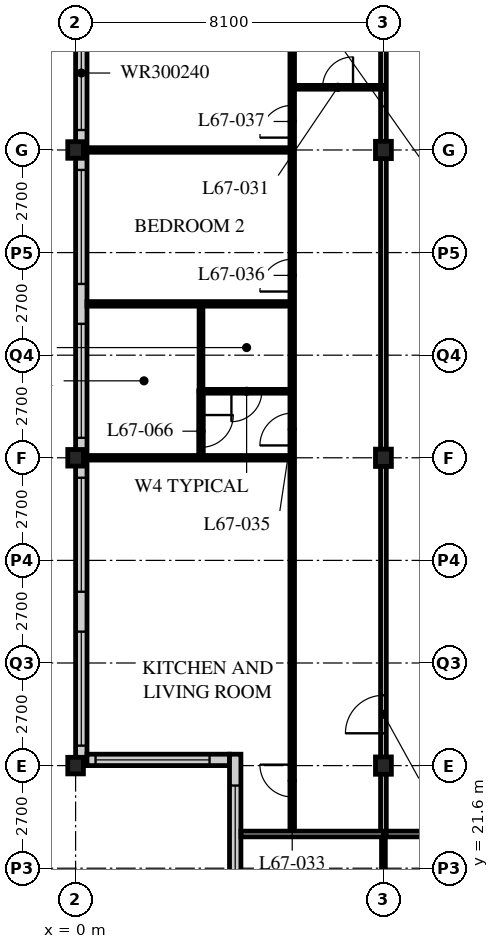
"""IFC4 building model, lengths in metres.
Left out: names, types, materials, properties, quantities, classifications, styles, units other than length and angle.
Written with IfcOpenShell. Run it as: python <this file> out.ifc"""

import sys

from ifc_helpers import new_model, si_unit, direction, frame, frame_2d, origin, origin_2d, place, context, subcontext, project, spatial, rectangle, i_section, extrude, element, fill, save


model = new_model("IFC4")
c1 = context("Model", 3, precision=1e-05, world=origin(), true_north=direction((0.0, 1.0)))
c2 = subcontext(c1, "Body", "Model", "MODEL_VIEW")
j1 = project(units=[si_unit("LENGTHUNIT", "METRE"), si_unit("PLANEANGLEUNIT", "RADIAN")], contexts=[c1])
p1 = place(None, origin())
s1 = spatial("IfcSite", under=j1, at=p1, CompositionType="ELEMENT")
p2 = place(p1, origin())
s2 = spatial("IfcBuilding", under=s1, at=p2, CompositionType="ELEMENT")
p3 = place(p2, frame((0.0, 0.0, 261.9)))
s3 = spatial("IfcBuildingStorey", under=s2, at=p3, CompositionType="ELEMENT", Elevation=261.9)
for number, where, z_axis, x_axis in (
    (1, (0.0, 24.3, 0.0), (0.0, 0.0, 1.0), (1.0, 0.0, 0.0)),
    (2, (0.0, 32.4, 0.0), (0.0, 0.0, 1.0), (1.0, 0.0, 0.0)),
    (3, (0.0, 40.5, 0.0), (0.0, 0.0, 1.0), (1.0, 0.0, 0.0)),
):
    element("IfcColumn", number, at=place(p3, frame(where, z_axis=z_axis, x_axis=x_axis)), inside=s3, PredefinedType="COLUMN", context=c2, shape_type="SweptSolid", body=[
        extrude(i_section(OverallWidth=0.412, OverallDepth=0.437, WebThickness=0.036, FlangeThickness=0.058, FilletRadius=0.015, at=origin_2d()), origin(), (0.0, 0.0, 1.0), 3.9),
    ])
for number, where, z_axis, x_axis in (
    (4, (8.1, 24.3, 0.0), (0.0, 0.0, 1.0), (1.0, 0.0, 0.0)),
    (5, (8.1, 32.4, 0.0), (0.0, 0.0, 1.0), (1.0, 0.0, 0.0)),
    (6, (8.1, 40.5, 0.0), (0.0, 0.0, 1.0), (1.0, 0.0, 0.0)),
):
    element("IfcColumn", number, at=place(p3, frame(where, z_axis=z_axis, x_axis=x_axis)), inside=s3, PredefinedType="COLUMN", context=c2, shape_type="SweptSolid", body=[
        extrude(i_section(OverallWidth=0.418, OverallDepth=0.456, WebThickness=0.042, FlangeThickness=0.067, FilletRadius=0.015, at=origin_2d()), origin(), (0.0, 0.0, 1.0), 3.9),
    ])
p4 = place(p3, frame((0.15, 56.4, 0.0), z_axis=(0.0, 0.0, 1.0), x_axis=(0.0, -1.0, 0.0)))
e7 = element("IfcWall", 7, at=p4, inside=s3, PredefinedType="SOLIDWALL", context=c2, shape_type="SweptSolid", body=[
    extrude(rectangle(XDim=32.1, YDim=0.3, at=frame_2d((16.05, 0.0))), origin(), (0.0, 0.0, 1.0), 3.69),
])
p5 = place(p4, frame((0.225, 0.0, 0.6)))
e8 = element("IfcOpeningElement", 8, at=p5, cuts=e7, PredefinedType="OPENING", context=c2, shape_type="SweptSolid", body=[
    extrude(rectangle(XDim=3.0, YDim=2.4, at=frame_2d((1.5, 1.2))), frame((0.0, 0.16, 0.0), z_axis=(0.0, -1.0, 0.0), x_axis=(1.0, 0.0, 0.0)), (0.0, 0.0, 1.0), 0.32),
])
p6 = place(p4, frame((4.275, 0.0, 0.6)))
e9 = element("IfcOpeningElement", 9, at=p6, cuts=e7, PredefinedType="OPENING", context=c2, shape_type="SweptSolid", body=[
    extrude(rectangle(XDim=3.0, YDim=2.4, at=frame_2d((1.5, 1.2))), frame((0.0, 0.16, 0.0), z_axis=(0.0, -1.0, 0.0), x_axis=(1.0, 0.0, 0.0)), (0.0, 0.0, 1.0), 0.32),
])
p7 = place(p4, frame((8.325, 0.0, 0.6)))
e10 = element("IfcOpeningElement", 10, at=p7, cuts=e7, PredefinedType="OPENING", context=c2, shape_type="SweptSolid", body=[
    extrude(rectangle(XDim=3.0, YDim=2.4, at=frame_2d((1.5, 1.2))), frame((0.0, 0.16, 0.0), z_axis=(0.0, -1.0, 0.0), x_axis=(1.0, 0.0, 0.0)), (0.0, 0.0, 1.0), 0.32),
])
p8 = place(p4, frame((12.375, 0.0, 0.6)))
e11 = element("IfcOpeningElement", 11, at=p8, cuts=e7, PredefinedType="OPENING", context=c2, shape_type="SweptSolid", body=[
    extrude(rectangle(XDim=3.0, YDim=2.4, at=frame_2d((1.5, 1.2))), frame((0.0, 0.16, 0.0), z_axis=(0.0, -1.0, 0.0), x_axis=(1.0, 0.0, 0.0)), (0.0, 0.0, 1.0), 0.32),
])
p9 = place(p4, frame((16.425, 0.0, 0.6)))
e12 = element("IfcOpeningElement", 12, at=p9, cuts=e7, PredefinedType="OPENING", context=c2, shape_type="SweptSolid", body=[
    extrude(rectangle(XDim=3.0, YDim=2.4, at=frame_2d((1.5, 1.2))), frame((0.0, 0.16, 0.0), z_axis=(0.0, -1.0, 0.0), x_axis=(1.0, 0.0, 0.0)), (0.0, 0.0, 1.0), 0.32),
])
p10 = place(p4, frame((20.475, 0.0, 0.6)))
e13 = element("IfcOpeningElement", 13, at=p10, cuts=e7, PredefinedType="OPENING", context=c2, shape_type="SweptSolid", body=[
    extrude(rectangle(XDim=3.0, YDim=2.4, at=frame_2d((1.5, 1.2))), frame((0.0, 0.16, 0.0), z_axis=(0.0, -1.0, 0.0), x_axis=(1.0, 0.0, 0.0)), (0.0, 0.0, 1.0), 0.32),
])
p11 = place(p4, frame((24.525, 0.0, 0.6)))
e14 = element("IfcOpeningElement", 14, at=p11, cuts=e7, PredefinedType="OPENING", context=c2, shape_type="SweptSolid", body=[
    extrude(rectangle(XDim=3.0, YDim=2.4, at=frame_2d((1.5, 1.2))), frame((0.0, 0.16, 0.0), z_axis=(0.0, -1.0, 0.0), x_axis=(1.0, 0.0, 0.0)), (0.0, 0.0, 1.0), 0.32),
])
p12 = place(p4, frame((28.575, 0.0, 0.6)))
e15 = element("IfcOpeningElement", 15, at=p12, cuts=e7, PredefinedType="OPENING", context=c2, shape_type="SweptSolid", body=[
    extrude(rectangle(XDim=3.0, YDim=2.4, at=frame_2d((1.5, 1.2))), frame((0.0, 0.16, 0.0), z_axis=(0.0, -1.0, 0.0), x_axis=(1.0, 0.0, 0.0)), (0.0, 0.0, 1.0), 0.32),
])
p13 = place(p3, frame((0.3, 24.45, 0.0), z_axis=(0.0, 0.0, 1.0), x_axis=(1.0, 0.0, 0.0)))
e16 = element("IfcWall", 16, at=p13, inside=s3, PredefinedType="SOLIDWALL", context=c2, shape_type="SweptSolid", body=[
    extrude(rectangle(XDim=3.75, YDim=0.3, at=frame_2d((1.875, 0.0))), origin(), (0.0, 0.0, 1.0), 3.69),
])
p14 = place(p13, frame((0.225, 0.0, 0.6)))
e17 = element("IfcOpeningElement", 17, at=p14, cuts=e16, PredefinedType="OPENING", context=c2, shape_type="SweptSolid", body=[
    extrude(rectangle(XDim=3.0, YDim=2.3, at=frame_2d((1.5, 1.15))), frame((0.0, 0.16, 0.0), z_axis=(0.0, -1.0, 0.0), x_axis=(1.0, 0.0, 0.0)), (0.0, 0.0, 1.0), 0.32),
])
p15 = place(p3, frame((4.2, 24.6, 0.0), z_axis=(0.0, 0.0, 1.0), x_axis=(0.0, -1.0, 0.0)))
e18 = element("IfcWall", 18, at=p15, inside=s3, PredefinedType="SOLIDWALL", context=c2, shape_type="SweptSolid", body=[
    extrude(rectangle(XDim=4.35, YDim=0.3, at=frame_2d((2.175, 0.0))), origin(), (0.0, 0.0, 1.0), 3.69),
])
p16 = place(p15, frame((0.825, 0.0, 0.6)))
e19 = element("IfcOpeningElement", 19, at=p16, cuts=e18, PredefinedType="OPENING", context=c2, shape_type="SweptSolid", body=[
    extrude(rectangle(XDim=3.0, YDim=2.3, at=frame_2d((1.5, 1.15))), frame((0.0, 0.16, 0.0), z_axis=(0.0, -1.0, 0.0), x_axis=(1.0, 0.0, 0.0)), (0.0, 0.0, 1.0), 0.32),
])
p17 = place(p3, frame((8.1, 22.5, 0.0), z_axis=(0.0, 0.0, 1.0), x_axis=(1.0, 0.0, 0.0)))
e20 = element("IfcWall", 20, at=p17, inside=s3, PredefinedType="PARTITIONING", context=c2, shape_type="SweptSolid", body=[
    extrude(rectangle(XDim=28.35, YDim=0.15, at=frame_2d((14.175, 0.0))), origin(), (0.0, 0.0, 1.0), 3.69),
])
p18 = place(p17, frame((4.45, 0.0, 0.0)))
e21 = element("IfcOpeningElement", 21, at=p18, cuts=e20, PredefinedType="OPENING", context=c2, shape_type="SweptSolid", body=[
    extrude(rectangle(XDim=1.0, YDim=2.1, at=frame_2d((0.5, 1.05))), frame((0.0, 0.085, 0.0), z_axis=(0.0, -1.0, 0.0), x_axis=(1.0, 0.0, 0.0)), (0.0, 0.0, 1.0), 0.17),
])
p19 = place(p17, frame((12.55, 0.0, 0.0)))
e22 = element("IfcOpeningElement", 22, at=p19, cuts=e20, PredefinedType="OPENING", context=c2, shape_type="SweptSolid", body=[
    extrude(rectangle(XDim=1.0, YDim=2.1, at=frame_2d((0.5, 1.05))), frame((0.0, 0.085, 0.0), z_axis=(0.0, -1.0, 0.0), x_axis=(1.0, 0.0, 0.0)), (0.0, 0.0, 1.0), 0.17),
])
p20 = place(p17, frame((20.65, 0.0, 0.0)))
e23 = element("IfcOpeningElement", 23, at=p20, cuts=e20, PredefinedType="OPENING", context=c2, shape_type="SweptSolid", body=[
    extrude(rectangle(XDim=1.0, YDim=2.1, at=frame_2d((0.5, 1.05))), frame((0.0, 0.085, 0.0), z_axis=(0.0, -1.0, 0.0), x_axis=(1.0, 0.0, 0.0)), (0.0, 0.0, 1.0), 0.17),
])
p21 = place(p17, frame((2.625, 0.0, 0.0)))
e24 = element("IfcOpeningElement", 24, at=p21, cuts=e20, PredefinedType="OPENING", context=c2, shape_type="SweptSolid", body=[
    extrude(rectangle(XDim=1.0, YDim=2.1, at=frame_2d((0.5, 1.05))), frame((0.0, 0.085, 0.0), z_axis=(0.0, -1.0, 0.0), x_axis=(1.0, 0.0, 0.0)), (0.0, 0.0, 1.0), 0.17),
])
p22 = place(p3, frame((8.1, 22.5, 0.0), z_axis=(0.0, 0.0, 1.0), x_axis=(0.0, 1.0, 0.0)))
e25 = element("IfcWall", 25, at=p22, inside=s3, PredefinedType="PARTITIONING", context=c2, shape_type="SweptSolid", body=[
    extrude(rectangle(XDim=26.1, YDim=0.15, at=frame_2d((13.05, 0.0))), origin(), (0.0, 0.0, 1.0), 3.078),
])
p23 = place(p22, frame((2.65, 0.0, 0.0)))
e26 = element("IfcOpeningElement", 26, at=p23, cuts=e25, PredefinedType="OPENING", context=c2, shape_type="SweptSolid", body=[
    extrude(rectangle(XDim=1.0, YDim=2.1, at=frame_2d((0.5, 1.05))), frame((0.0, 0.085, 0.0), z_axis=(0.0, -1.0, 0.0), x_axis=(1.0, 0.0, 0.0)), (0.0, 0.0, 1.0), 0.17),
])
p24 = place(p22, frame((22.75, 0.0, 0.0)))
e27 = element("IfcOpeningElement", 27, at=p24, cuts=e25, PredefinedType="OPENING", context=c2, shape_type="SweptSolid", body=[
    extrude(rectangle(XDim=1.0, YDim=2.1, at=frame_2d((0.5, 1.05))), frame((0.0, 0.085, 0.0), z_axis=(0.0, -1.0, 0.0), x_axis=(1.0, 0.0, 0.0)), (0.0, 0.0, 1.0), 0.17),
])
p25 = place(p3, frame((5.7, 22.5, 0.0), z_axis=(0.0, 0.0, 1.0), x_axis=(0.0, 1.0, 0.0)))
e28 = element("IfcWall", 28, at=p25, inside=s3, PredefinedType="PARTITIONING", context=c2, shape_type="SweptSolid", body=[
    extrude(rectangle(XDim=22.05, YDim=0.12, at=frame_2d((11.025, 0.0))), origin(), (0.0, 0.0, 1.0), 3.69),
])
p26 = place(p25, frame((0.975, 0.0, 0.0)))
e29 = element("IfcOpeningElement", 29, at=p26, cuts=e28, PredefinedType="OPENING", context=c2, shape_type="SweptSolid", body=[
    extrude(rectangle(XDim=0.85, YDim=2.1, at=frame_2d((0.425, 1.05))), frame((0.0, 0.07, 0.0), z_axis=(0.0, -1.0, 0.0), x_axis=(1.0, 0.0, 0.0)), (0.0, 0.0, 1.0), 0.14),
])
p27 = place(p25, frame((10.225, 0.0, 0.0)))
e30 = element("IfcOpeningElement", 30, at=p27, cuts=e28, PredefinedType="OPENING", context=c2, shape_type="SweptSolid", body=[
    extrude(rectangle(XDim=0.85, YDim=2.1, at=frame_2d((0.425, 1.05))), frame((0.0, 0.07, 0.0), z_axis=(0.0, -1.0, 0.0), x_axis=(1.0, 0.0, 0.0)), (0.0, 0.0, 1.0), 0.14),
])
p28 = place(p25, frame((14.275, 0.0, 0.0)))
e31 = element("IfcOpeningElement", 31, at=p28, cuts=e28, PredefinedType="OPENING", context=c2, shape_type="SweptSolid", body=[
    extrude(rectangle(XDim=0.85, YDim=2.1, at=frame_2d((0.425, 1.05))), frame((0.0, 0.07, 0.0), z_axis=(0.0, -1.0, 0.0), x_axis=(1.0, 0.0, 0.0)), (0.0, 0.0, 1.0), 0.14),
])
p29 = place(p25, frame((18.325, 0.0, 0.0)))
e32 = element("IfcOpeningElement", 32, at=p29, cuts=e28, PredefinedType="OPENING", context=c2, shape_type="SweptSolid", body=[
    extrude(rectangle(XDim=0.85, YDim=2.1, at=frame_2d((0.425, 1.05))), frame((0.0, 0.07, 0.0), z_axis=(0.0, -1.0, 0.0), x_axis=(1.0, 0.0, 0.0)), (0.0, 0.0, 1.0), 0.14),
])
p30 = place(p3, frame((8.1, 42.15, 0.0), z_axis=(0.0, 0.0, 1.0), x_axis=(-1.0, 0.0, 0.0)))
e33 = element("IfcWall", 33, at=p30, inside=s3, PredefinedType="PARTITIONING", context=c2, shape_type="SweptSolid", body=[
    extrude(rectangle(XDim=2.4, YDim=0.1, at=frame_2d((1.2, 0.0))), origin(), (0.0, 0.0, 1.0), 3.69),
])
p31 = place(p30, frame((0.8, 0.0, 0.0)))
e34 = element("IfcOpeningElement", 34, at=p31, cuts=e33, PredefinedType="OPENING", context=c2, shape_type="SweptSolid", body=[
    extrude(rectangle(XDim=0.8, YDim=2.1, at=frame_2d((0.4, 1.05))), frame((0.0, 0.06, 0.0), z_axis=(0.0, -1.0, 0.0), x_axis=(1.0, 0.0, 0.0)), (0.0, 0.0, 1.0), 0.12),
])
p32 = place(p3, frame((5.7, 34.15, 0.0), z_axis=(0.0, 0.0, 1.0), x_axis=(-1.0, 0.0, 0.0)))
e35 = element("IfcWall", 35, at=p32, inside=s3, PredefinedType="PARTITIONING", context=c2, shape_type="SweptSolid", body=[
    extrude(rectangle(XDim=2.4, YDim=0.1, at=frame_2d((1.2, 0.0))), origin(), (0.0, 0.0, 1.0), 3.69),
])
p33 = place(p32, frame((0.8, 0.0, 0.0)))
e36 = element("IfcOpeningElement", 36, at=p33, cuts=e35, PredefinedType="OPENING", context=c2, shape_type="SweptSolid", body=[
    extrude(rectangle(XDim=0.8, YDim=2.1, at=frame_2d((0.4, 1.05))), frame((0.0, 0.06, 0.0), z_axis=(0.0, -1.0, 0.0), x_axis=(1.0, 0.0, 0.0)), (0.0, 0.0, 1.0), 0.12),
])
p34 = place(p3, frame((3.3, 34.15, 0.0), z_axis=(0.0, 0.0, 1.0), x_axis=(0.0, 1.0, 0.0)))
e37 = element("IfcWall", 37, at=p34, inside=s3, PredefinedType="PARTITIONING", context=c2, shape_type="SweptSolid", body=[
    extrude(rectangle(XDim=2.3, YDim=0.1, at=frame_2d((1.15, 0.0))), origin(), (0.0, 0.0, 1.0), 3.69),
])
p35 = place(p3, frame((5.7, 32.4, 0.0), z_axis=(0.0, 0.0, 1.0), x_axis=(-1.0, 0.0, 0.0)))
e38 = element("IfcWall", 38, at=p35, inside=s3, PredefinedType="PARTITIONING", context=c2, shape_type="SweptSolid", body=[
    extrude(rectangle(XDim=5.4, YDim=0.12, at=frame_2d((2.7, 0.0))), origin(), (0.0, 0.0, 1.0), 3.078),
])
p36 = place(p3, frame((5.7, 36.45, 0.0), z_axis=(0.0, 0.0, 1.0), x_axis=(-1.0, 0.0, 0.0)))
e39 = element("IfcWall", 39, at=p36, inside=s3, PredefinedType="PARTITIONING", context=c2, shape_type="SweptSolid", body=[
    extrude(rectangle(XDim=5.4, YDim=0.12, at=frame_2d((2.7, 0.0))), origin(), (0.0, 0.0, 1.0), 3.69),
])
p37 = place(p3, frame((5.7, 40.5, 0.0), z_axis=(0.0, 0.0, 1.0), x_axis=(-1.0, 0.0, 0.0)))
e40 = element("IfcWall", 40, at=p37, inside=s3, PredefinedType="PARTITIONING", context=c2, shape_type="SweptSolid", body=[
    extrude(rectangle(XDim=5.4, YDim=0.12, at=frame_2d((2.7, 0.0))), origin(), (0.0, 0.0, 1.0), 3.078),
])
p38 = place(p3, frame((8.1, 22.5, 0.0), z_axis=(0.0, 0.0, 1.0), x_axis=(0.0, -1.0, 0.0)))
e41 = element("IfcWall", 41, at=p38, inside=s3, PredefinedType="PARTITIONING", context=c2, shape_type="SweptSolid", body=[
    extrude(rectangle(XDim=1.95, YDim=0.1, at=frame_2d((0.975, 0.0))), origin(), (0.0, 0.0, 1.0), 3.078),
])
p39 = place(p3, frame((4.35, 22.5, 0.0), z_axis=(0.0, 0.0, 1.0), x_axis=(1.0, 0.0, 0.0)))
e42 = element("IfcWall", 42, at=p39, inside=s3, PredefinedType="PARTITIONING", context=c2, shape_type="SweptSolid", body=[
    extrude(rectangle(XDim=3.75, YDim=0.15, at=frame_2d((1.875, 0.0))), origin(), (0.0, 0.0, 1.0), 3.69),
])
p40 = place(p3, frame((3.3, 32.4, 0.0), z_axis=(0.0, 0.0, 1.0), x_axis=(0.0, 1.0, 0.0)))
e43 = element("IfcWall", 43, at=p40, inside=s3, PredefinedType="PARTITIONING", context=c2, shape_type="SweptSolid", body=[
    extrude(rectangle(XDim=1.76, YDim=0.12, at=frame_2d((0.88, 0.0))), origin(), (0.0, 0.0, 1.0), 3.69),
])
p41 = place(p40, frame((0.275, 0.0, 0.0)))
e44 = element("IfcOpeningElement", 44, at=p41, cuts=e43, PredefinedType="OPENING", context=c2, shape_type="SweptSolid", body=[
    extrude(rectangle(XDim=0.85, YDim=2.1, at=frame_2d((0.425, 1.05))), frame((0.0, 0.07, 0.0), z_axis=(0.0, -1.0, 0.0), x_axis=(1.0, 0.0, 0.0)), (0.0, 0.0, 1.0), 0.14),
])
p42 = place(p8, origin())
e45 = element("IfcWindow", 45, at=p42, inside=s3, PartitioningType="SINGLE_PANEL", PredefinedType="WINDOW", context=c2, shape_type="SweptSolid", body=[
    extrude(rectangle(XDim=3.0, YDim=2.4, at=frame_2d((1.5, 1.2))), frame((0.0, 0.03, 0.0), z_axis=(0.0, -1.0, 0.0), x_axis=(1.0, 0.0, 0.0)), (0.0, 0.0, 1.0), 0.06),
])
fill(e11, e45)
p43 = place(p9, origin())
e46 = element("IfcWindow", 46, at=p43, inside=s3, PartitioningType="SINGLE_PANEL", PredefinedType="WINDOW", context=c2, shape_type="SweptSolid", body=[
    extrude(rectangle(XDim=3.0, YDim=2.4, at=frame_2d((1.5, 1.2))), frame((0.0, 0.03, 0.0), z_axis=(0.0, -1.0, 0.0), x_axis=(1.0, 0.0, 0.0)), (0.0, 0.0, 1.0), 0.06),
])
fill(e12, e46)
p44 = place(p10, origin())
e47 = element("IfcWindow", 47, at=p44, inside=s3, PartitioningType="SINGLE_PANEL", PredefinedType="WINDOW", context=c2, shape_type="SweptSolid", body=[
    extrude(rectangle(XDim=3.0, YDim=2.4, at=frame_2d((1.5, 1.2))), frame((0.0, 0.03, 0.0), z_axis=(0.0, -1.0, 0.0), x_axis=(1.0, 0.0, 0.0)), (0.0, 0.0, 1.0), 0.06),
])
fill(e13, e47)
p45 = place(p11, origin())
e48 = element("IfcWindow", 48, at=p45, inside=s3, PartitioningType="SINGLE_PANEL", PredefinedType="WINDOW", context=c2, shape_type="SweptSolid", body=[
    extrude(rectangle(XDim=3.0, YDim=2.4, at=frame_2d((1.5, 1.2))), frame((0.0, 0.03, 0.0), z_axis=(0.0, -1.0, 0.0), x_axis=(1.0, 0.0, 0.0)), (0.0, 0.0, 1.0), 0.06),
])
fill(e14, e48)
p46 = place(p12, origin())
e49 = element("IfcWindow", 49, at=p46, inside=s3, PartitioningType="SINGLE_PANEL", PredefinedType="WINDOW", context=c2, shape_type="SweptSolid", body=[
    extrude(rectangle(XDim=3.0, YDim=2.4, at=frame_2d((1.5, 1.2))), frame((0.0, 0.03, 0.0), z_axis=(0.0, -1.0, 0.0), x_axis=(1.0, 0.0, 0.0)), (0.0, 0.0, 1.0), 0.06),
])
fill(e15, e49)
p47 = place(p14, origin())
e50 = element("IfcWindow", 50, at=p47, inside=s3, PartitioningType="SINGLE_PANEL", PredefinedType="WINDOW", context=c2, shape_type="SweptSolid", body=[
    extrude(rectangle(XDim=3.0, YDim=2.3, at=frame_2d((1.5, 1.15))), frame((0.0, 0.03, 0.0), z_axis=(0.0, -1.0, 0.0), x_axis=(1.0, 0.0, 0.0)), (0.0, 0.0, 1.0), 0.06),
])
fill(e17, e50)
p48 = place(p16, origin())
e51 = element("IfcWindow", 51, at=p48, inside=s3, PartitioningType="SINGLE_PANEL", PredefinedType="WINDOW", context=c2, shape_type="SweptSolid", body=[
    extrude(rectangle(XDim=3.0, YDim=2.3, at=frame_2d((1.5, 1.15))), frame((0.0, 0.03, 0.0), z_axis=(0.0, -1.0, 0.0), x_axis=(1.0, 0.0, 0.0)), (0.0, 0.0, 1.0), 0.06),
])
fill(e19, e51)
p49 = place(p31, origin())
e52 = element("IfcDoor", 52, at=p49, inside=s3, OperationType="SINGLE_SWING_RIGHT", PredefinedType="DOOR", context=c2, shape_type="SweptSolid", body=[
    extrude(rectangle(XDim=0.8, YDim=2.1, at=frame_2d((0.4, 1.05))), frame((0.0, 0.025, 0.0), z_axis=(0.0, -1.0, 0.0), x_axis=(1.0, 0.0, 0.0)), (0.0, 0.0, 1.0), 0.05),
])
fill(e34, e52)
p50 = place(p23, origin())
e53 = element("IfcDoor", 53, at=p50, inside=s3, OperationType="SINGLE_SWING_LEFT", PredefinedType="DOOR", context=c2, shape_type="SweptSolid", body=[
    extrude(rectangle(XDim=1.0, YDim=2.1, at=frame_2d((0.5, 1.05))), frame((0.0, 0.025, 0.0), z_axis=(0.0, -1.0, 0.0), x_axis=(1.0, 0.0, 0.0)), (0.0, 0.0, 1.0), 0.05),
])
fill(e26, e53)
p51 = place(p26, origin())
e54 = element("IfcDoor", 54, at=p51, inside=s3, OperationType="SINGLE_SWING_RIGHT", PredefinedType="DOOR", context=c2, shape_type="SweptSolid", body=[
    extrude(rectangle(XDim=0.85, YDim=2.1, at=frame_2d((0.425, 1.05))), frame((0.0, 0.025, 0.0), z_axis=(0.0, -1.0, 0.0), x_axis=(1.0, 0.0, 0.0)), (0.0, 0.0, 1.0), 0.05),
])
fill(e29, e54)
p52 = place(p33, origin())
e55 = element("IfcDoor", 55, at=p52, inside=s3, OperationType="SINGLE_SWING_RIGHT", PredefinedType="DOOR", context=c2, shape_type="SweptSolid", body=[
    extrude(rectangle(XDim=0.8, YDim=2.1, at=frame_2d((0.4, 1.05))), frame((0.0, 0.025, 0.0), z_axis=(0.0, -1.0, 0.0), x_axis=(1.0, 0.0, 0.0)), (0.0, 0.0, 1.0), 0.05),
])
fill(e36, e55)
p53 = place(p27, origin())
e56 = element("IfcDoor", 56, at=p53, inside=s3, OperationType="SINGLE_SWING_LEFT", PredefinedType="DOOR", context=c2, shape_type="SweptSolid", body=[
    extrude(rectangle(XDim=0.85, YDim=2.1, at=frame_2d((0.425, 1.05))), frame((0.0, 0.025, 0.0), z_axis=(0.0, -1.0, 0.0), x_axis=(1.0, 0.0, 0.0)), (0.0, 0.0, 1.0), 0.05),
])
fill(e30, e56)
p54 = place(p28, origin())
e57 = element("IfcDoor", 57, at=p54, inside=s3, OperationType="SINGLE_SWING_LEFT", PredefinedType="DOOR", context=c2, shape_type="SweptSolid", body=[
    extrude(rectangle(XDim=0.85, YDim=2.1, at=frame_2d((0.425, 1.05))), frame((0.0, 0.025, 0.0), z_axis=(0.0, -1.0, 0.0), x_axis=(1.0, 0.0, 0.0)), (0.0, 0.0, 1.0), 0.05),
])
fill(e31, e57)
p55 = place(p29, origin())
e58 = element("IfcDoor", 58, at=p55, inside=s3, OperationType="SINGLE_SWING_LEFT", PredefinedType="DOOR", context=c2, shape_type="SweptSolid", body=[
    extrude(rectangle(XDim=0.85, YDim=2.1, at=frame_2d((0.425, 1.05))), frame((0.0, 0.025, 0.0), z_axis=(0.0, -1.0, 0.0), x_axis=(1.0, 0.0, 0.0)), (0.0, 0.0, 1.0), 0.05),
])
fill(e32, e58)
p56 = place(p41, origin())
e59 = element("IfcDoor", 59, at=p56, inside=s3, OperationType="SINGLE_SWING_LEFT", PredefinedType="DOOR", context=c2, shape_type="SweptSolid", body=[
    extrude(rectangle(XDim=0.85, YDim=2.1, at=frame_2d((0.425, 1.05))), frame((0.0, 0.025, 0.0), z_axis=(0.0, -1.0, 0.0), x_axis=(1.0, 0.0, 0.0)), (0.0, 0.0, 1.0), 0.05),
])
fill(e44, e59)
save(model, sys.argv[1])
